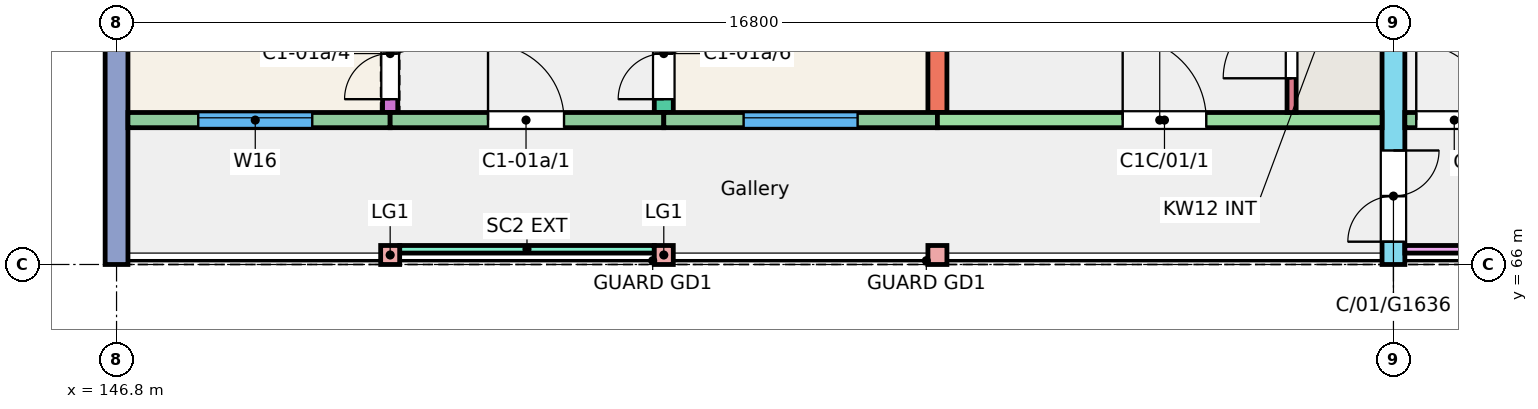
"""IFC4 building model, lengths in metres.
Left out: names, types, materials, properties, quantities, classifications, styles, units other than length and angle.
Written with IfcOpenShell. Run it as: python <this file> out.ifc"""

import sys

from ifc_helpers import new_model, si_unit, direction, frame, frame_2d, origin, origin_2d, place, context, subcontext, project, spatial, rectangle, extrude, element, fill, save


model = new_model("IFC4")
c1 = context("Model", 3, precision=1e-05, world=origin(), true_north=direction((0.0, 1.0)))
c2 = subcontext(c1, "Body", "Model", "MODEL_VIEW")
j1 = project(units=[si_unit("LENGTHUNIT", "METRE"), si_unit("PLANEANGLEUNIT", "RADIAN")], contexts=[c1])
p1 = place(None, origin())
s1 = spatial("IfcSite", under=j1, at=p1, CompositionType="ELEMENT")
p2 = place(p1, origin())
s2 = spatial("IfcBuilding", under=s1, at=p2, CompositionType="ELEMENT")
p3 = place(p2, frame((0.0, 0.0, 3.0)))
s3 = spatial("IfcBuildingStorey", under=s2, at=p3, CompositionType="ELEMENT", Elevation=3.0)
p4 = place(p3, frame((146.8, 66.0, 0.0), z_axis=(0.0, 0.0, 1.0), x_axis=(0.0, 1.0, 0.0)))
e1 = element("IfcWall", 1, at=p4, inside=s3, PredefinedType="SHEAR", context=c2, shape_type="SweptSolid", body=[
    extrude(rectangle(XDim=11.0, YDim=0.3, at=frame_2d((5.5, 0.0))), origin(), (0.0, 0.0, 1.0), 3.0),
])
p5 = place(p4, frame((3.55, 0.0, 0.9)))
e2 = element("IfcOpeningElement", 2, at=p5, cuts=e1, PredefinedType="OPENING", context=c2, shape_type="SweptSolid", body=[
    extrude(rectangle(XDim=1.5, YDim=1.5, at=frame_2d((0.75, 0.75))), frame((0.0, 0.16, 0.0), z_axis=(0.0, -1.0, 0.0), x_axis=(1.0, 0.0, 0.0)), (0.0, 0.0, 1.0), 0.32),
])
p6 = place(p4, frame((8.105, 0.0, 0.9)))
e3 = element("IfcOpeningElement", 3, at=p6, cuts=e1, PredefinedType="OPENING", context=c2, shape_type="SweptSolid", body=[
    extrude(rectangle(XDim=1.5, YDim=1.5, at=frame_2d((0.75, 0.75))), frame((0.0, 0.16, 0.0), z_axis=(0.0, -1.0, 0.0), x_axis=(1.0, 0.0, 0.0)), (0.0, 0.0, 1.0), 0.32),
])
p7 = place(p3, frame((150.4, 68.0, 0.0), z_axis=(0.0, 0.0, 1.0), x_axis=(0.0, 1.0, 0.0)))
e4 = element("IfcWall", 4, at=p7, inside=s3, PredefinedType="SHEAR", context=c2, shape_type="SweptSolid", body=[
    extrude(rectangle(XDim=9.0, YDim=0.2, at=frame_2d((4.5, 0.0))), origin(), (0.0, 0.0, 1.0), 3.0),
])
p8 = place(p7, frame((0.175, 0.0, 0.0)))
e5 = element("IfcOpeningElement", 5, at=p8, cuts=e4, PredefinedType="OPENING", context=c2, shape_type="SweptSolid", body=[
    extrude(rectangle(XDim=1.2, YDim=2.1, at=frame_2d((0.6, 1.05))), frame((0.0, 0.11, 0.0), z_axis=(0.0, -1.0, 0.0), x_axis=(1.0, 0.0, 0.0)), (0.0, 0.0, 1.0), 0.22),
])
p9 = place(p7, frame((6.4, 0.0, 0.0)))
e6 = element("IfcOpeningElement", 6, at=p9, cuts=e4, PredefinedType="OPENING", context=c2, shape_type="SweptSolid", body=[
    extrude(rectangle(XDim=1.2, YDim=2.1, at=frame_2d((0.6, 1.05))), frame((0.0, 0.11, 0.0), z_axis=(0.0, -1.0, 0.0), x_axis=(1.0, 0.0, 0.0)), (0.0, 0.0, 1.0), 0.22),
])
p10 = place(p3, frame((154.0, 68.0, 0.0), z_axis=(0.0, 0.0, 1.0), x_axis=(0.0, 1.0, 0.0)))
e7 = element("IfcWall", 7, at=p10, inside=s3, PredefinedType="SHEAR", context=c2, shape_type="SweptSolid", body=[
    extrude(rectangle(XDim=9.0, YDim=0.25, at=frame_2d((4.5, 0.0))), origin(), (0.0, 0.0, 1.0), 3.0),
])
p11 = place(p10, frame((0.175, 0.0, 0.0)))
e8 = element("IfcOpeningElement", 8, at=p11, cuts=e7, PredefinedType="OPENING", context=c2, shape_type="SweptSolid", body=[
    extrude(rectangle(XDim=1.2, YDim=2.1, at=frame_2d((0.6, 1.05))), frame((0.0, 0.135, 0.0), z_axis=(0.0, -1.0, 0.0), x_axis=(1.0, 0.0, 0.0)), (0.0, 0.0, 1.0), 0.27),
])
p12 = place(p10, frame((6.4, 0.0, 0.0)))
e9 = element("IfcOpeningElement", 9, at=p12, cuts=e7, PredefinedType="OPENING", context=c2, shape_type="SweptSolid", body=[
    extrude(rectangle(XDim=1.2, YDim=2.1, at=frame_2d((0.6, 1.05))), frame((0.0, 0.135, 0.0), z_axis=(0.0, -1.0, 0.0), x_axis=(1.0, 0.0, 0.0)), (0.0, 0.0, 1.0), 0.27),
])
p13 = place(p3, frame((157.6, 68.0, 0.0), z_axis=(0.0, 0.0, 1.0), x_axis=(0.0, 1.0, 0.0)))
e10 = element("IfcWall", 10, at=p13, inside=s3, PredefinedType="SHEAR", context=c2, shape_type="SweptSolid", body=[
    extrude(rectangle(XDim=9.0, YDim=0.25, at=frame_2d((4.5, 0.0))), origin(), (0.0, 0.0, 1.0), 3.0),
])
p14 = place(p3, frame((163.6, 66.0, 0.0), z_axis=(0.0, 0.0, 1.0), x_axis=(0.0, 1.0, 0.0)))
e11 = element("IfcWall", 11, at=p14, inside=s3, PredefinedType="SHEAR", context=c2, shape_type="SweptSolid", body=[
    extrude(rectangle(XDim=11.0, YDim=0.3, at=frame_2d((5.5, 0.0))), origin(), (0.0, 0.0, 1.0), 3.0),
])
p15 = place(p14, frame((0.3, 0.0, 0.0)))
e12 = element("IfcOpeningElement", 12, at=p15, cuts=e11, PredefinedType="OPENING", context=c2, shape_type="SweptSolid", body=[
    extrude(rectangle(XDim=1.2, YDim=2.1, at=frame_2d((0.6, 1.05))), frame((0.0, 0.16, 0.0), z_axis=(0.0, -1.0, 0.0), x_axis=(1.0, 0.0, 0.0)), (0.0, 0.0, 1.0), 0.32),
])
p16 = place(p3, frame((146.95, 67.9, 0.0), z_axis=(0.0, 0.0, 1.0), x_axis=(1.0, 0.0, 0.0)))
e13 = element("IfcWall", 13, at=p16, inside=s3, PredefinedType="SOLIDWALL", context=c2, shape_type="SweptSolid", body=[
    extrude(rectangle(XDim=3.45, YDim=0.2, at=frame_2d((1.725, 0.0))), origin(), (0.0, 0.0, 1.0), 3.0),
])
p17 = place(p16, frame((0.925, 0.0, 0.9)))
e14 = element("IfcOpeningElement", 14, at=p17, cuts=e13, PredefinedType="OPENING", context=c2, shape_type="SweptSolid", body=[
    extrude(rectangle(XDim=1.5, YDim=1.5, at=frame_2d((0.75, 0.75))), frame((0.0, 0.11, 0.0), z_axis=(0.0, -1.0, 0.0), x_axis=(1.0, 0.0, 0.0)), (0.0, 0.0, 1.0), 0.22),
])
p18 = place(p3, frame((150.4, 67.9, 0.0), z_axis=(0.0, 0.0, 1.0), x_axis=(1.0, 0.0, 0.0)))
e15 = element("IfcWall", 15, at=p18, inside=s3, PredefinedType="SOLIDWALL", context=c2, shape_type="SweptSolid", body=[
    extrude(rectangle(XDim=3.6, YDim=0.2, at=frame_2d((1.8, 0.0))), origin(), (0.0, 0.0, 1.0), 3.0),
])
p19 = place(p18, frame((1.288, 0.0, 0.0)))
e16 = element("IfcOpeningElement", 16, at=p19, cuts=e15, PredefinedType="OPENING", context=c2, shape_type="SweptSolid", body=[
    extrude(rectangle(XDim=1.0, YDim=2.1, at=frame_2d((0.5, 1.05))), frame((0.0, 0.11, 0.0), z_axis=(0.0, -1.0, 0.0), x_axis=(1.0, 0.0, 0.0)), (0.0, 0.0, 1.0), 0.22),
])
p20 = place(p3, frame((154.0, 67.9, 0.0), z_axis=(0.0, 0.0, 1.0), x_axis=(1.0, 0.0, 0.0)))
e17 = element("IfcWall", 17, at=p20, inside=s3, PredefinedType="SOLIDWALL", context=c2, shape_type="SweptSolid", body=[
    extrude(rectangle(XDim=3.6, YDim=0.2, at=frame_2d((1.8, 0.0))), origin(), (0.0, 0.0, 1.0), 3.0),
])
p21 = place(p20, frame((1.05, 0.0, 0.9)))
e18 = element("IfcOpeningElement", 18, at=p21, cuts=e17, PredefinedType="OPENING", context=c2, shape_type="SweptSolid", body=[
    extrude(rectangle(XDim=1.5, YDim=1.5, at=frame_2d((0.75, 0.75))), frame((0.0, 0.11, 0.0), z_axis=(0.0, -1.0, 0.0), x_axis=(1.0, 0.0, 0.0)), (0.0, 0.0, 1.0), 0.22),
])
p22 = place(p3, frame((157.6, 67.9, 0.0), z_axis=(0.0, 0.0, 1.0), x_axis=(1.0, 0.0, 0.0)))
e19 = element("IfcWall", 19, at=p22, inside=s3, PredefinedType="SHEAR", context=c2, shape_type="SweptSolid", body=[
    extrude(rectangle(XDim=5.85, YDim=0.2, at=frame_2d((2.925, 0.0))), origin(), (0.0, 0.0, 1.0), 3.0),
])
p23 = place(p22, frame((2.438, 0.0, 0.0)))
e20 = element("IfcOpeningElement", 20, at=p23, cuts=e19, PredefinedType="OPENING", context=c2, shape_type="SweptSolid", body=[
    extrude(rectangle(XDim=1.1, YDim=2.1, at=frame_2d((0.55, 1.05))), frame((0.0, 0.11, 0.0), z_axis=(0.0, -1.0, 0.0), x_axis=(1.0, 0.0, 0.0)), (0.0, 0.0, 1.0), 0.22),
])
p24 = place(p3, frame((162.26, 68.0, 0.0), z_axis=(0.0, 0.0, 1.0), x_axis=(0.0, 1.0, 0.0)))
e21 = element("IfcWall", 21, at=p24, inside=s3, PredefinedType="SHEAR", context=c2, shape_type="SweptSolid", body=[
    extrude(rectangle(XDim=1.72, YDim=0.12, at=frame_2d((0.86, 0.0))), origin(), (0.0, 0.0, 1.0), 3.0),
])
p25 = place(p24, frame((0.45, 0.0, 0.0)))
e22 = element("IfcOpeningElement", 22, at=p25, cuts=e21, PredefinedType="OPENING", context=c2, shape_type="SweptSolid", body=[
    extrude(rectangle(XDim=0.9, YDim=2.1, at=frame_2d((0.45, 1.05))), frame((0.0, 0.07, 0.0), z_axis=(0.0, -1.0, 0.0), x_axis=(1.0, 0.0, 0.0)), (0.0, 0.0, 1.0), 0.14),
])
p26 = place(p3, frame((163.75, 67.9, 0.0), z_axis=(0.0, 0.0, 1.0), x_axis=(1.0, 0.0, 0.0)))
e23 = element("IfcWall", 23, at=p26, inside=s3, PredefinedType="SOLIDWALL", context=c2, shape_type="SweptSolid", body=[
    extrude(rectangle(XDim=3.45, YDim=0.2, at=frame_2d((1.725, 0.0))), origin(), (0.0, 0.0, 1.0), 3.0),
])
p27 = place(p26, frame((1.78, 0.0, 1.1)))
e24 = element("IfcOpeningElement", 24, at=p27, cuts=e23, PredefinedType="OPENING", context=c2, shape_type="SweptSolid", body=[
    extrude(rectangle(XDim=1.2, YDim=1.3, at=frame_2d((0.6, 0.65))), frame((0.0, 0.11, 0.0), z_axis=(0.0, -1.0, 0.0), x_axis=(1.0, 0.0, 0.0)), (0.0, 0.0, 1.0), 0.22),
])
p28 = place(p26, frame((0.15, 0.0, 0.0)))
e25 = element("IfcOpeningElement", 25, at=p28, cuts=e23, PredefinedType="OPENING", context=c2, shape_type="SweptSolid", body=[
    extrude(rectangle(XDim=1.0, YDim=2.1, at=frame_2d((0.5, 1.05))), frame((0.0, 0.11, 0.0), z_axis=(0.0, -1.0, 0.0), x_axis=(1.0, 0.0, 0.0)), (0.0, 0.0, 1.0), 0.22),
])
for number, where, z_axis, x_axis in (
    (26, (150.4, 66.125, 0.0), (0.0, 0.0, 1.0), (1.0, 0.0, 0.0)),
    (27, (154.0, 66.125, 0.0), (0.0, 0.0, 1.0), (1.0, 0.0, 0.0)),
    (28, (157.6, 66.125, 0.0), (0.0, 0.0, 1.0), (1.0, 0.0, 0.0)),
):
    element("IfcColumn", number, at=place(p3, frame(where, z_axis=z_axis, x_axis=x_axis)), inside=s3, PredefinedType="COLUMN", context=c2, shape_type="SweptSolid", body=[
        extrude(rectangle(XDim=0.25, YDim=0.25, at=origin_2d()), origin(), (0.0, 0.0, 1.0), 3.0),
    ])
p29 = place(p3, frame((150.525, 66.2, 0.0), z_axis=(0.0, 0.0, 1.0), x_axis=(1.0, 0.0, 0.0)))
e29 = element("IfcWall", 29, at=p29, inside=s3, PredefinedType="SOLIDWALL", context=c2, shape_type="SweptSolid", body=[
    extrude(rectangle(XDim=3.35, YDim=0.1, at=frame_2d((1.675, 0.0))), origin(), (0.0, 0.0, 1.0), 2.45),
])
p30 = place(p3, frame((163.75, 66.2, 0.0), z_axis=(0.0, 0.0, 1.0), x_axis=(1.0, 0.0, 0.0)))
e30 = element("IfcWall", 30, at=p30, inside=s3, PredefinedType="SOLIDWALL", context=c2, shape_type="SweptSolid", body=[
    extrude(rectangle(XDim=3.325, YDim=0.1, at=frame_2d((1.663, 0.0))), origin(), (0.0, 0.0, 1.0), 2.45),
])
p31 = place(p17, origin())
e31 = element("IfcWindow", 31, at=p31, inside=s3, PartitioningType="SINGLE_PANEL", PredefinedType="WINDOW", context=c2, shape_type="SweptSolid", body=[
    extrude(rectangle(XDim=1.5, YDim=1.5, at=frame_2d((0.75, 0.75))), frame((0.0, 0.06, 0.0), z_axis=(0.0, -1.0, 0.0), x_axis=(1.0, 0.0, 0.0)), (0.0, 0.0, 1.0), 0.06),
])
fill(e14, e31)
p32 = place(p21, origin())
e32 = element("IfcWindow", 32, at=p32, inside=s3, PartitioningType="SINGLE_PANEL", PredefinedType="WINDOW", context=c2, shape_type="SweptSolid", body=[
    extrude(rectangle(XDim=1.5, YDim=1.5, at=frame_2d((0.75, 0.75))), frame((0.0, 0.06, 0.0), z_axis=(0.0, -1.0, 0.0), x_axis=(1.0, 0.0, 0.0)), (0.0, 0.0, 1.0), 0.06),
])
fill(e18, e32)
p33 = place(p19, origin())
e33 = element("IfcDoor", 33, at=p33, inside=s3, OperationType="SINGLE_SWING_LEFT", PredefinedType="DOOR", context=c2, shape_type="SweptSolid", body=[
    extrude(rectangle(XDim=1.0, YDim=2.1, at=frame_2d((0.5, 1.05))), frame((0.0, 0.025, 0.0), z_axis=(0.0, -1.0, 0.0), x_axis=(1.0, 0.0, 0.0)), (0.0, 0.0, 1.0), 0.05),
])
fill(e16, e33)
p34 = place(p8, origin())
e34 = element("IfcDoor", 34, at=p34, inside=s3, OperationType="DOUBLE_DOOR_SINGLE_SWING", PredefinedType="DOOR", context=c2, shape_type="SweptSolid", body=[
    extrude(rectangle(XDim=1.2, YDim=2.1, at=frame_2d((0.6, 1.05))), frame((0.0, 0.025, 0.0), z_axis=(0.0, -1.0, 0.0), x_axis=(1.0, 0.0, 0.0)), (0.0, 0.0, 1.0), 0.05),
])
fill(e5, e34)
p35 = place(p11, origin())
e35 = element("IfcDoor", 35, at=p35, inside=s3, OperationType="DOUBLE_DOOR_SINGLE_SWING", PredefinedType="DOOR", context=c2, shape_type="SweptSolid", body=[
    extrude(rectangle(XDim=1.2, YDim=2.1, at=frame_2d((0.6, 1.05))), frame((0.0, 0.025, 0.0), z_axis=(0.0, -1.0, 0.0), x_axis=(1.0, 0.0, 0.0)), (0.0, 0.0, 1.0), 0.05),
])
fill(e8, e35)
p36 = place(p28, origin())
e36 = element("IfcDoor", 36, at=p36, inside=s3, OperationType="SINGLE_SWING_LEFT", PredefinedType="DOOR", context=c2, shape_type="SweptSolid", body=[
    extrude(rectangle(XDim=1.0, YDim=2.1, at=frame_2d((0.5, 1.05))), frame((0.0, 0.025, 0.0), z_axis=(0.0, -1.0, 0.0), x_axis=(1.0, 0.0, 0.0)), (0.0, 0.0, 1.0), 0.05),
])
fill(e25, e36)
p37 = place(p23, origin())
e37 = element("IfcDoor", 37, at=p37, inside=s3, OperationType="SINGLE_SWING_LEFT", PredefinedType="DOOR", context=c2, shape_type="SweptSolid", body=[
    extrude(rectangle(XDim=1.1, YDim=2.1, at=frame_2d((0.55, 1.05))), frame((0.0, 0.025, 0.0), z_axis=(0.0, -1.0, 0.0), x_axis=(1.0, 0.0, 0.0)), (0.0, 0.0, 1.0), 0.05),
])
fill(e20, e37)
p38 = place(p25, origin())
e38 = element("IfcDoor", 38, at=p38, inside=s3, OperationType="SINGLE_SWING_LEFT", PredefinedType="DOOR", context=c2, shape_type="SweptSolid", body=[
    extrude(rectangle(XDim=0.9, YDim=2.1, at=frame_2d((0.45, 1.05))), frame((0.0, 0.025, 0.0), z_axis=(0.0, -1.0, 0.0), x_axis=(1.0, 0.0, 0.0)), (0.0, 0.0, 1.0), 0.05),
])
fill(e22, e38)
p39 = place(p15, origin())
e39 = element("IfcDoor", 39, at=p39, inside=s3, OperationType="DOUBLE_DOOR_SINGLE_SWING", PredefinedType="DOOR", context=c2, shape_type="SweptSolid", body=[
    extrude(rectangle(XDim=1.2, YDim=2.1, at=frame_2d((0.6, 1.05))), frame((0.0, 0.025, 0.0), z_axis=(0.0, -1.0, 0.0), x_axis=(1.0, 0.0, 0.0)), (0.0, 0.0, 1.0), 0.05),
])
fill(e12, e39)
save(model, sys.argv[1])
